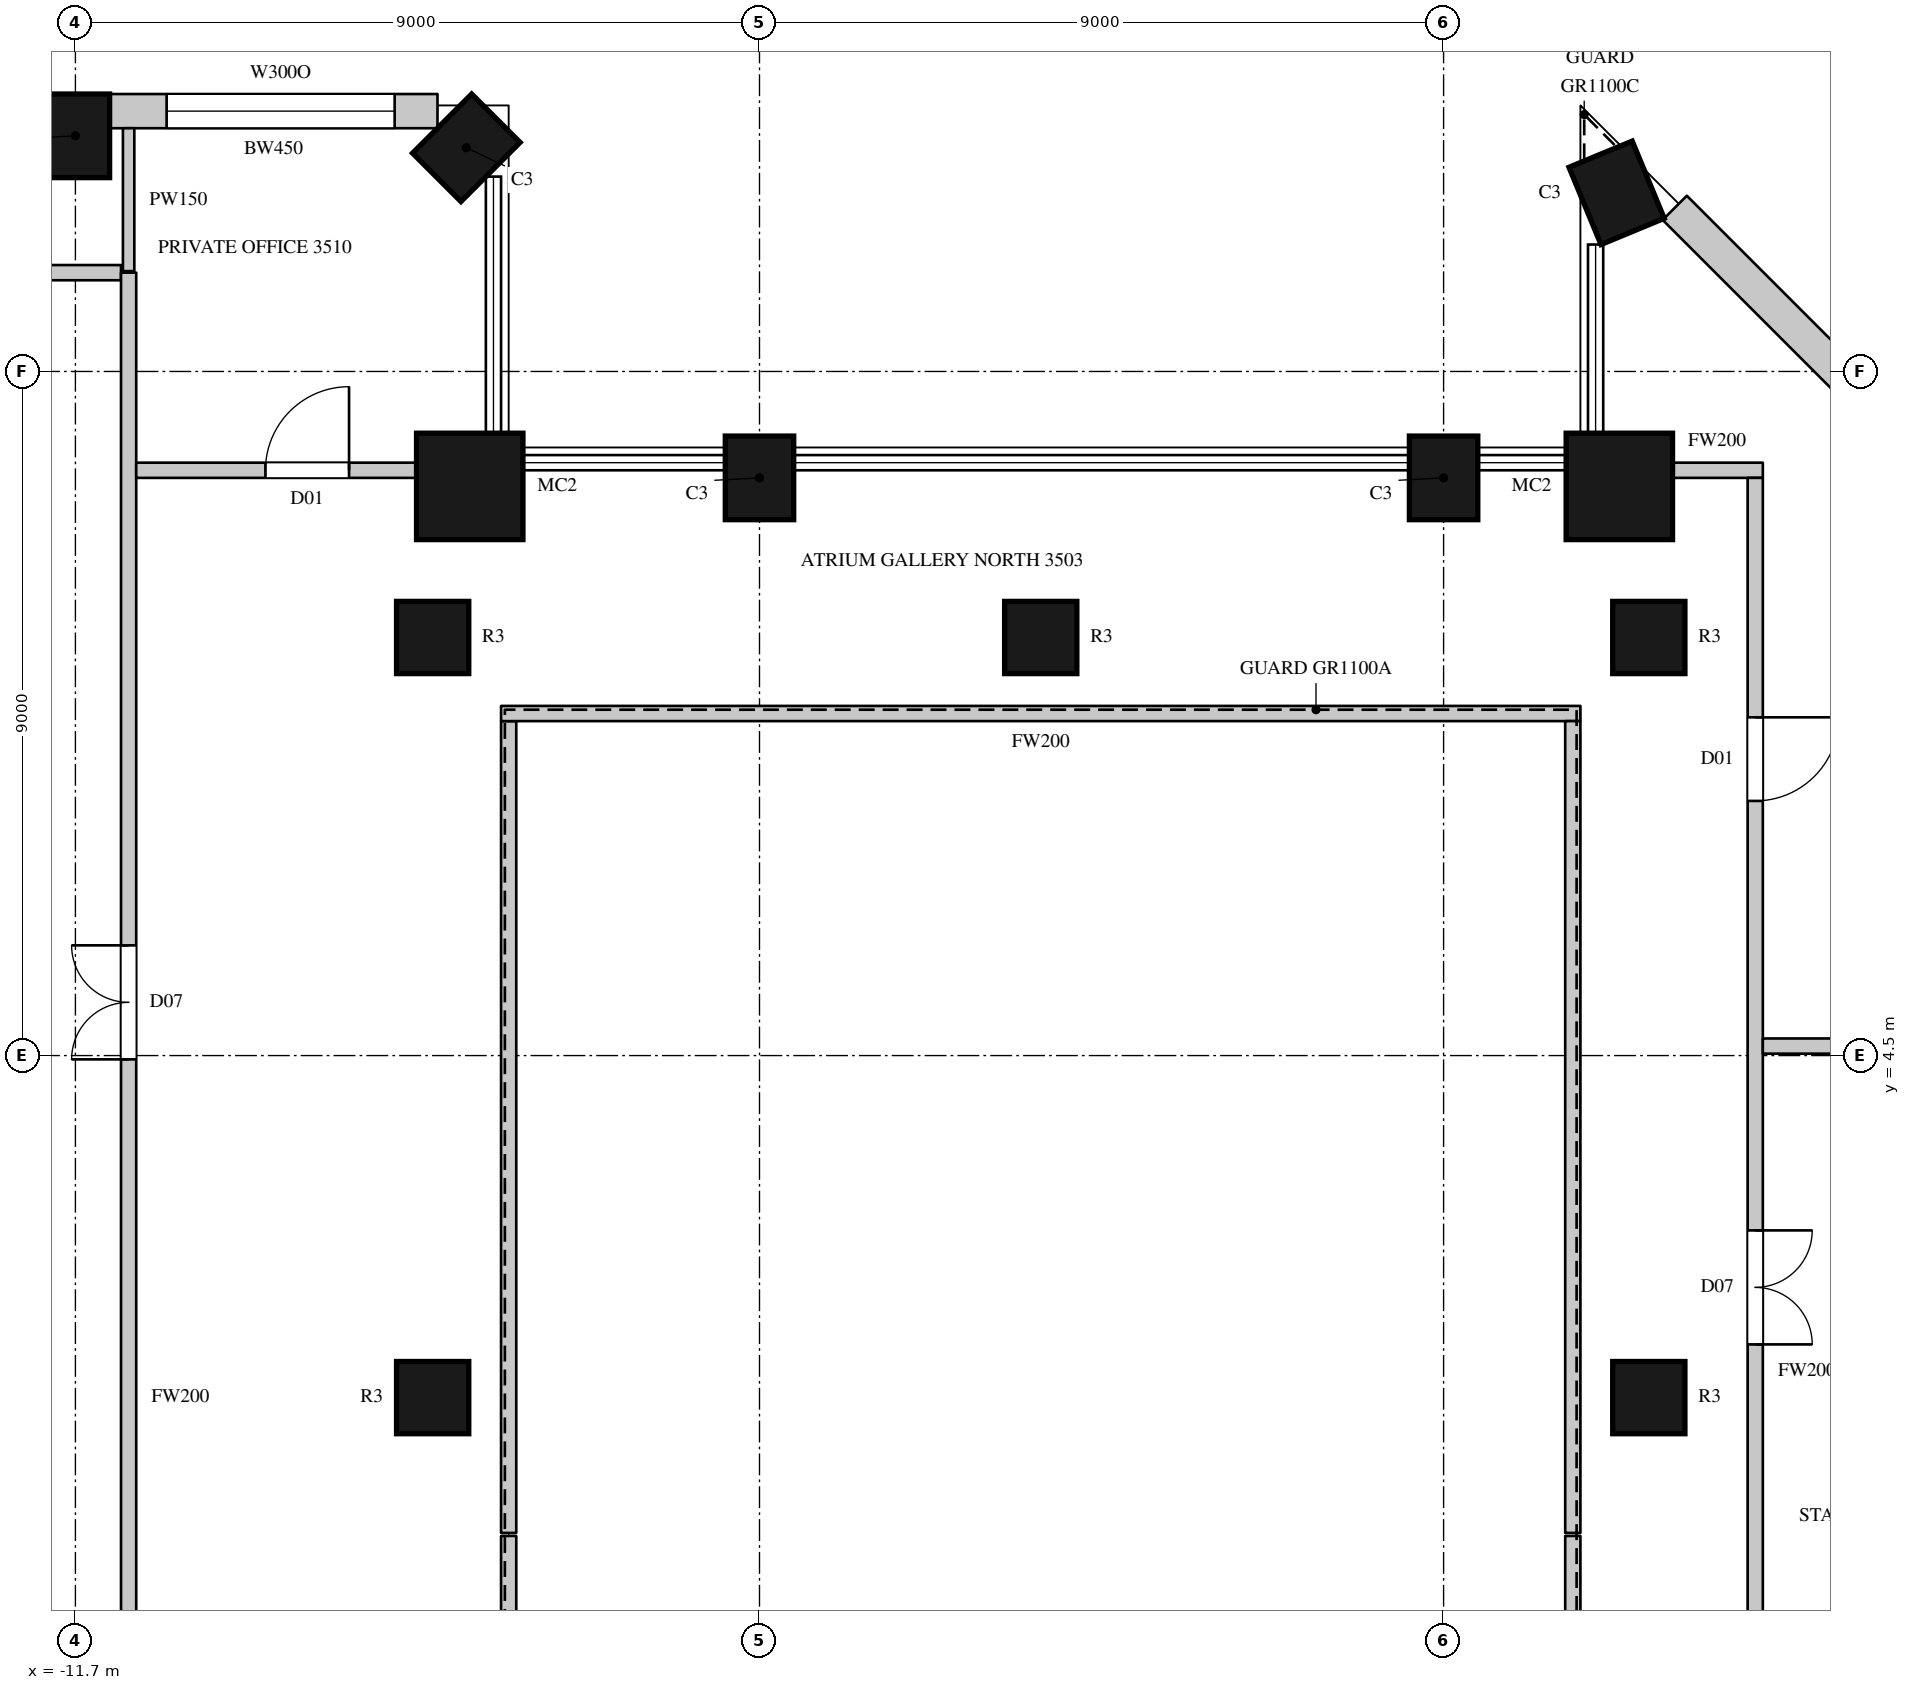
"""IFC4 building model, lengths in metres.
Left out: names, types, materials, properties, quantities, classifications, styles, units other than length and angle.
Written with IfcOpenShell. Run it as: python <this file> out.ifc"""

import sys

from ifc_helpers import new_model, si_unit, direction, frame, frame_2d, origin, origin_2d, place, context, subcontext, project, spatial, rectangle, circle, extrude, element, fill, save


model = new_model("IFC4")
c1 = context("Model", 3, precision=1e-05, world=origin(), true_north=direction((0.0, 1.0)))
c2 = subcontext(c1, "Body", "Model", "MODEL_VIEW")
j1 = project(units=[si_unit("LENGTHUNIT", "METRE"), si_unit("PLANEANGLEUNIT", "RADIAN")], contexts=[c1])
p1 = place(None, origin())
s1 = spatial("IfcSite", under=j1, at=p1, CompositionType="ELEMENT")
p2 = place(p1, origin())
s2 = spatial("IfcBuilding", under=s1, at=p2, CompositionType="ELEMENT")
p3 = place(p2, frame((0.0, 0.0, 164.6)))
s3 = spatial("IfcBuildingStorey", under=s2, at=p3, CompositionType="ELEMENT", Elevation=164.6)
p4 = place(p3, frame((8.576, 15.85, 0.0), z_axis=(0.0, 0.0, 1.0), x_axis=(-0.923879672772, -0.382683093746, 0.0)))
e1 = element("IfcColumn", 1, at=p4, inside=s3, PredefinedType="COLUMN", context=c2, shape_type="SweptSolid", body=[
    extrude(rectangle(XDim=0.9, YDim=1.1, at=origin_2d()), origin(), (0.0, 0.0, 1.0), 4.1),
])
p5 = place(p3, frame((8.612, 11.988, 0.0), z_axis=(0.0, 0.0, 1.0), x_axis=(1.0, 0.0, 0.0)))
e2 = element("IfcColumn", 2, at=p5, inside=s3, PredefinedType="COLUMN", context=c2, shape_type="SweptSolid", body=[
    extrude(circle(Radius=0.7, at=origin_2d()), origin(), (0.0, 0.0, 1.0), 4.1),
])
for number, where, z_axis, x_axis in (
    (3, (6.3, 12.1, 0.0), (0.0, 0.0, 1.0), (-1.0, 0.0, 0.0)),
    (4, (-2.7, 12.1, 0.0), (0.0, 0.0, 1.0), (-1.0, 0.0, 0.0)),
):
    element("IfcColumn", number, at=place(p3, frame(where, z_axis=z_axis, x_axis=x_axis)), inside=s3, PredefinedType="COLUMN", context=c2, shape_type="SweptSolid", body=[
        extrude(rectangle(XDim=0.9, YDim=1.1, at=origin_2d()), origin(), (0.0, 0.0, 1.0), 4.1),
    ])
p6 = place(p3, frame((-6.512, 11.988, 0.0), z_axis=(0.0, 0.0, 1.0), x_axis=(1.0, 0.0, 0.0)))
e5 = element("IfcColumn", 5, at=p6, inside=s3, PredefinedType="COLUMN", context=c2, shape_type="SweptSolid", body=[
    extrude(circle(Radius=0.7, at=origin_2d()), origin(), (0.0, 0.0, 1.0), 4.1),
])
for number, where, z_axis, x_axis in (
    (6, (-6.557, 16.443, 0.0), (0.0, 0.0, 1.0), (-0.707, 0.707, 0.0)),
    (7, (-11.7, 16.6, 0.0), (0.0, 0.0, 1.0), (-1.0, 0.0, 0.0)),
):
    element("IfcColumn", number, at=place(p3, frame(where, z_axis=z_axis, x_axis=x_axis)), inside=s3, PredefinedType="COLUMN", context=c2, shape_type="SweptSolid", body=[
        extrude(rectangle(XDim=0.9, YDim=1.1, at=origin_2d()), origin(), (0.0, 0.0, 1.0), 4.1),
    ])
for number, where, z_axis, x_axis in (
    (8, (-7.0, 0.0, 0.0), (0.0, 0.0, 1.0), (1.0, 0.0, 0.0)),
    (9, (-7.0, 10.0, 0.0), (0.0, 0.0, 1.0), (1.0, 0.0, 0.0)),
    (10, (1.0, 10.0, 0.0), (0.0, 0.0, 1.0), (1.0, 0.0, 0.0)),
    (11, (9.0, 0.0, 0.0), (0.0, 0.0, 1.0), (1.0, 0.0, 0.0)),
    (12, (9.0, 10.0, 0.0), (0.0, 0.0, 1.0), (1.0, 0.0, 0.0)),
):
    element("IfcColumn", number, at=place(p3, frame(where, z_axis=z_axis, x_axis=x_axis)), inside=s3, PredefinedType="COLUMN", context=c2, shape_type="SweptSolid", body=[
        extrude(circle(Radius=0.475, at=origin_2d()), origin(), (0.0, 0.0, 1.0), 4.1),
    ])
p7 = place(p3, frame((13.941, 11.053, 0.0), z_axis=(0.0, 0.0, 1.0), x_axis=(-0.707106781187, 0.707106781187, 0.0)))
e13 = element("IfcWall", 13, at=p7, inside=s3, PredefinedType="SOLIDWALL", context=c2, shape_type="SweptSolid", body=[
    extrude(rectangle(XDim=6.505, YDim=0.45, at=frame_2d((3.252, 0.0))), origin(), (0.0, 0.0, 1.0), 3.8),
])
p8 = place(p7, frame((0.665, 0.0, 0.0)))
e14 = element("IfcOpeningElement", 14, at=p8, cuts=e13, PredefinedType="OPENING", context=c2, shape_type="SweptSolid", body=[
    extrude(rectangle(XDim=1.8, YDim=2.4, at=frame_2d((0.9, 1.2))), frame((0.0, 0.235, 0.0), z_axis=(0.0, -1.0, 0.0), x_axis=(1.0, 0.0, 0.0)), (0.0, 0.0, 1.0), 0.47),
])
p9 = place(p3, frame((-6.936, 16.925, 0.0), z_axis=(0.0, 0.0, 1.0), x_axis=(-1.0, 0.0, 0.0)))
e15 = element("IfcWall", 15, at=p9, inside=s3, PredefinedType="SOLIDWALL", context=c2, shape_type="SweptSolid", body=[
    extrude(rectangle(XDim=4.314, YDim=0.45, at=frame_2d((2.157, 0.0))), origin(), (0.0, 0.0, 1.0), 3.8),
])
p10 = place(p9, frame((0.564, 0.0, 1.05)))
e16 = element("IfcOpeningElement", 16, at=p10, cuts=e15, PredefinedType="OPENING", context=c2, shape_type="SweptSolid", body=[
    extrude(rectangle(XDim=3.0, YDim=2.4, at=frame_2d((1.5, 1.2))), frame((0.0, 0.235, 0.0), z_axis=(0.0, -1.0, 0.0), x_axis=(1.0, 0.0, 0.0)), (0.0, 0.0, 1.0), 0.47),
])
p11 = place(p3, frame((12.251, 14.263, 0.0), z_axis=(0.0, 0.0, 1.0), x_axis=(-0.707039709166, 0.707173846846, 0.0)))
e17 = element("IfcWall", 17, at=p11, inside=s3, PredefinedType="SOLIDWALL", context=c2, shape_type="SweptSolid", body=[
    extrude(rectangle(XDim=1.82, YDim=0.45, at=frame_2d((0.91, 0.0))), origin(), (0.0, 0.0, 1.0), 0.6),
])
p12 = place(p3, frame((-13.97, 14.8, 0.0), z_axis=(0.0, 0.0, 1.0), x_axis=(1.0, 0.0, 0.0)))
e18 = element("IfcWall", 18, at=p12, inside=s3, PredefinedType="PARTITIONING", context=c2, shape_type="SweptSolid", body=[
    extrude(rectangle(XDim=2.87, YDim=0.2, at=frame_2d((1.435, 0.0))), origin(), (0.0, 0.0, 1.0), 3.8),
])
p13 = place(p3, frame((-11.0, -14.8, 0.0), z_axis=(0.0, 0.0, 1.0), x_axis=(0.0, 1.0, 0.0)))
e19 = element("IfcWall", 19, at=p13, inside=s3, PredefinedType="PARTITIONING", context=c2, shape_type="SweptSolid", body=[
    extrude(rectangle(XDim=29.6, YDim=0.2, at=frame_2d((14.8, 0.0))), origin(), (0.0, 0.0, 1.0), 3.8),
])
p14 = place(p13, frame((19.25, 0.0, 0.0)))
e20 = element("IfcOpeningElement", 20, at=p14, cuts=e19, PredefinedType="OPENING", context=c2, shape_type="SweptSolid", body=[
    extrude(rectangle(XDim=1.5, YDim=2.4, at=frame_2d((0.75, 1.2))), frame((0.0, 0.11, 0.0), z_axis=(0.0, -1.0, 0.0), x_axis=(1.0, 0.0, 0.0)), (0.0, 0.0, 1.0), 0.22),
])
p15 = place(p3, frame((-10.9, 12.2, 0.0), z_axis=(0.0, 0.0, 1.0), x_axis=(1.0, 0.0, 0.0)))
e21 = element("IfcWall", 21, at=p15, inside=s3, PredefinedType="PARTITIONING", context=c2, shape_type="SweptSolid", body=[
    extrude(rectangle(XDim=3.704, YDim=0.2, at=frame_2d((1.852, 0.0))), origin(), (0.0, 0.0, 1.0), 3.8),
])
p16 = place(p15, frame((1.7, 0.0, 0.0)))
e22 = element("IfcOpeningElement", 22, at=p16, cuts=e21, PredefinedType="OPENING", context=c2, shape_type="SweptSolid", body=[
    extrude(rectangle(XDim=1.1, YDim=2.4, at=frame_2d((0.55, 1.2))), frame((0.0, 0.11, 0.0), z_axis=(0.0, -1.0, 0.0), x_axis=(1.0, 0.0, 0.0)), (0.0, 0.0, 1.0), 0.22),
])
p17 = place(p3, frame((-6.0, -8.9, 0.0), z_axis=(0.0, 0.0, 1.0), x_axis=(0.0, 1.0, 0.0)))
e23 = element("IfcWall", 23, at=p17, inside=s3, PredefinedType="PARTITIONING", context=c2, shape_type="SweptSolid", body=[
    extrude(rectangle(XDim=7.08, YDim=0.2, at=frame_2d((3.54, 0.0))), origin(), (0.0, 0.0, 1.0), 3.8),
])
p18 = place(p3, frame((-6.0, -1.78, 0.0), z_axis=(0.0, 0.0, 1.0), x_axis=(0.0, 1.0, 0.0)))
e24 = element("IfcWall", 24, at=p18, inside=s3, PredefinedType="PARTITIONING", context=c2, shape_type="SweptSolid", body=[
    extrude(rectangle(XDim=10.68, YDim=0.2, at=frame_2d((5.34, 0.0))), origin(), (0.0, 0.0, 1.0), 3.8),
])
p19 = place(p3, frame((-6.1, 9.0, 0.0), z_axis=(0.0, 0.0, 1.0), x_axis=(1.0, 0.0, 0.0)))
e25 = element("IfcWall", 25, at=p19, inside=s3, PredefinedType="PARTITIONING", context=c2, shape_type="SweptSolid", body=[
    extrude(rectangle(XDim=14.2, YDim=0.2, at=frame_2d((7.1, 0.0))), origin(), (0.0, 0.0, 1.0), 3.8),
])
p20 = place(p3, frame((8.0, -8.9, 0.0), z_axis=(0.0, 0.0, 1.0), x_axis=(0.0, 1.0, 0.0)))
e26 = element("IfcWall", 26, at=p20, inside=s3, PredefinedType="PARTITIONING", context=c2, shape_type="SweptSolid", body=[
    extrude(rectangle(XDim=7.08, YDim=0.2, at=frame_2d((3.54, 0.0))), origin(), (0.0, 0.0, 1.0), 3.8),
])
p21 = place(p3, frame((8.0, -1.78, 0.0), z_axis=(0.0, 0.0, 1.0), x_axis=(0.0, 1.0, 0.0)))
e27 = element("IfcWall", 27, at=p21, inside=s3, PredefinedType="PARTITIONING", context=c2, shape_type="SweptSolid", body=[
    extrude(rectangle(XDim=10.68, YDim=0.2, at=frame_2d((5.34, 0.0))), origin(), (0.0, 0.0, 1.0), 3.8),
])
p22 = place(p3, frame((9.296, 12.2, 0.0), z_axis=(0.0, 0.0, 1.0), x_axis=(1.0, 0.0, 0.0)))
e28 = element("IfcWall", 28, at=p22, inside=s3, PredefinedType="PARTITIONING", context=c2, shape_type="SweptSolid", body=[
    extrude(rectangle(XDim=1.204, YDim=0.2, at=frame_2d((0.602, 0.0))), origin(), (0.0, 0.0, 1.0), 3.8),
])
p23 = place(p3, frame((10.4, -11.4, 0.0), z_axis=(0.0, 0.0, 1.0), x_axis=(0.0, 1.0, 0.0)))
e29 = element("IfcWall", 29, at=p23, inside=s3, PredefinedType="PARTITIONING", context=c2, shape_type="SweptSolid", body=[
    extrude(rectangle(XDim=23.5, YDim=0.2, at=frame_2d((11.75, 0.0))), origin(), (0.0, 0.0, 1.0), 3.8),
])
p24 = place(p23, frame((12.1, 0.0, 0.0)))
e30 = element("IfcOpeningElement", 30, at=p24, cuts=e29, PredefinedType="OPENING", context=c2, shape_type="SweptSolid", body=[
    extrude(rectangle(XDim=1.5, YDim=2.4, at=frame_2d((0.75, 1.2))), frame((0.0, 0.11, 0.0), z_axis=(0.0, -1.0, 0.0), x_axis=(1.0, 0.0, 0.0)), (0.0, 0.0, 1.0), 0.22),
])
p25 = place(p23, frame((19.25, 0.0, 0.0)))
e31 = element("IfcOpeningElement", 31, at=p25, cuts=e29, PredefinedType="OPENING", context=c2, shape_type="SweptSolid", body=[
    extrude(rectangle(XDim=1.1, YDim=2.4, at=frame_2d((0.55, 1.2))), frame((0.0, 0.11, 0.0), z_axis=(0.0, -1.0, 0.0), x_axis=(1.0, 0.0, 0.0)), (0.0, 0.0, 1.0), 0.22),
])
p26 = place(p23, frame((4.45, 0.0, 0.0)))
e32 = element("IfcOpeningElement", 32, at=p26, cuts=e29, PredefinedType="OPENING", context=c2, shape_type="SweptSolid", body=[
    extrude(rectangle(XDim=1.1, YDim=2.4, at=frame_2d((0.55, 1.2))), frame((0.0, 0.11, 0.0), z_axis=(0.0, -1.0, 0.0), x_axis=(1.0, 0.0, 0.0)), (0.0, 0.0, 1.0), 0.22),
])
p27 = place(p3, frame((10.5, 4.625, 0.0), z_axis=(0.0, 0.0, 1.0), x_axis=(1.0, 0.0, 0.0)))
e33 = element("IfcWall", 33, at=p27, inside=s3, PredefinedType="PARTITIONING", context=c2, shape_type="SweptSolid", body=[
    extrude(rectangle(XDim=4.175, YDim=0.2, at=frame_2d((2.087, 0.0))), origin(), (0.0, 0.0, 1.0), 3.8),
])
p28 = place(p3, frame((-11.0, 14.82, 0.0), z_axis=(0.0, 0.0, 1.0), x_axis=(0.0, 1.0, 0.0)))
e34 = element("IfcWall", 34, at=p28, inside=s3, PredefinedType="PARTITIONING", context=c2, shape_type="SweptSolid", body=[
    extrude(rectangle(XDim=1.88, YDim=0.15, at=frame_2d((0.94, 0.0))), origin(), (0.0, 0.0, 1.0), 3.8),
])
p29 = place(p10, origin())
e35 = element("IfcWindow", 35, at=p29, inside=s3, PartitioningType="SINGLE_PANEL", PredefinedType="WINDOW", context=c2, shape_type="SweptSolid", body=[
    extrude(rectangle(XDim=3.0, YDim=2.4, at=frame_2d((1.5, 1.2))), frame((0.0, 0.135, 0.0), z_axis=(0.0, -1.0, 0.0), x_axis=(1.0, 0.0, 0.0)), (0.0, 0.0, 1.0), 0.06),
])
fill(e16, e35)
p30 = place(p14, origin())
e36 = element("IfcDoor", 36, at=p30, inside=s3, OperationType="DOUBLE_DOOR_SINGLE_SWING", PredefinedType="DOOR", context=c2, shape_type="SweptSolid", body=[
    extrude(rectangle(XDim=1.5, YDim=2.4, at=frame_2d((0.75, 1.2))), frame((0.0, 0.025, 0.0), z_axis=(0.0, -1.0, 0.0), x_axis=(1.0, 0.0, 0.0)), (0.0, 0.0, 1.0), 0.05),
])
fill(e20, e36)
p31 = place(p24, origin())
e37 = element("IfcDoor", 37, at=p31, inside=s3, OperationType="DOUBLE_DOOR_SINGLE_SWING", PredefinedType="DOOR", context=c2, shape_type="SweptSolid", body=[
    extrude(rectangle(XDim=1.5, YDim=2.4, at=frame_2d((0.75, 1.2))), frame((0.0, 0.025, 0.0), z_axis=(0.0, -1.0, 0.0), x_axis=(1.0, 0.0, 0.0)), (0.0, 0.0, 1.0), 0.05),
])
fill(e30, e37)
p32 = place(p16, origin())
e38 = element("IfcDoor", 38, at=p32, inside=s3, OperationType="SINGLE_SWING_RIGHT", PredefinedType="DOOR", context=c2, shape_type="SweptSolid", body=[
    extrude(rectangle(XDim=1.1, YDim=2.4, at=frame_2d((0.55, 1.2))), frame((0.0, 0.025, 0.0), z_axis=(0.0, -1.0, 0.0), x_axis=(1.0, 0.0, 0.0)), (0.0, 0.0, 1.0), 0.05),
])
fill(e22, e38)
p33 = place(p25, origin())
e39 = element("IfcDoor", 39, at=p33, inside=s3, OperationType="SINGLE_SWING_LEFT", PredefinedType="DOOR", context=c2, shape_type="SweptSolid", body=[
    extrude(rectangle(XDim=1.1, YDim=2.4, at=frame_2d((0.55, 1.2))), frame((0.0, 0.025, 0.0), z_axis=(0.0, -1.0, 0.0), x_axis=(1.0, 0.0, 0.0)), (0.0, 0.0, 1.0), 0.05),
])
fill(e31, e39)
save(model, sys.argv[1])
